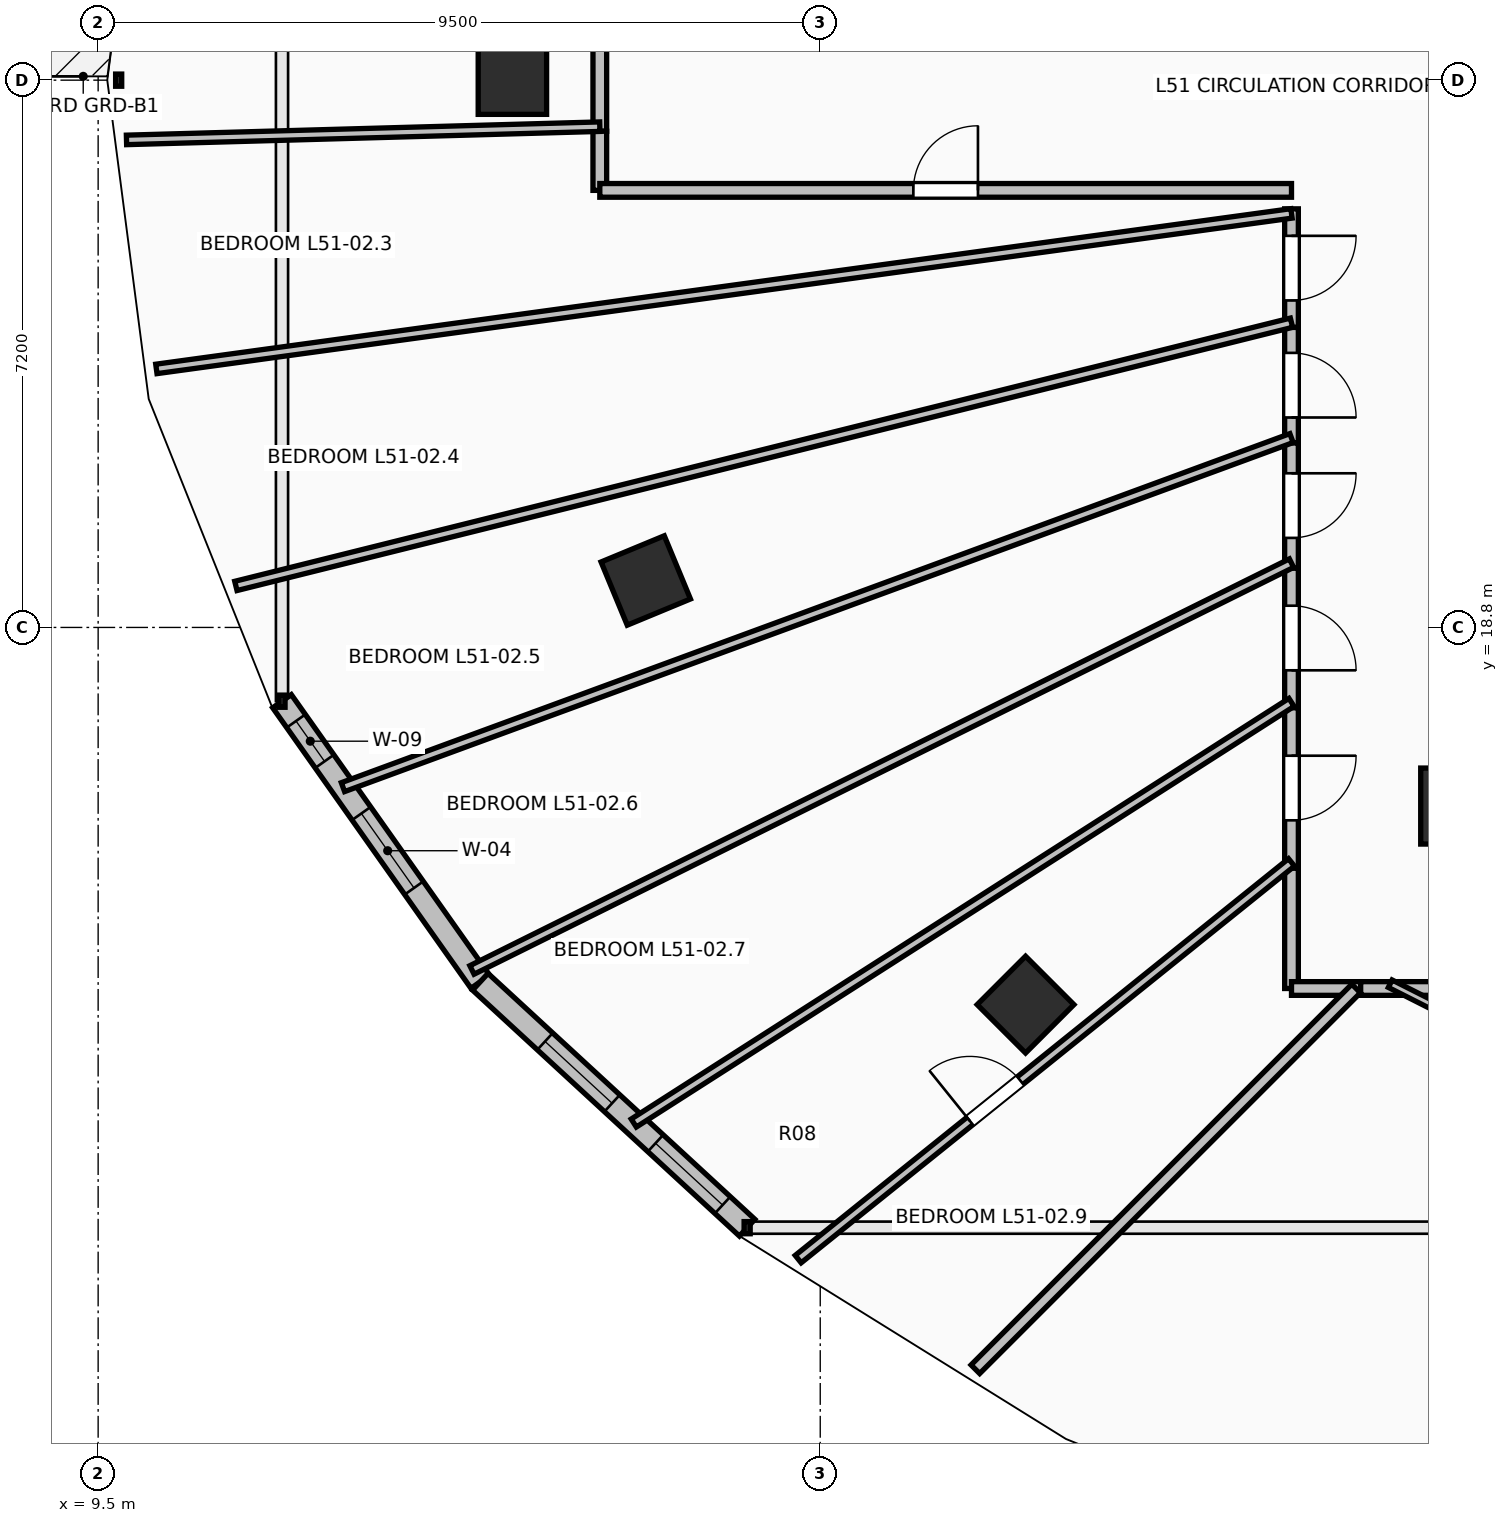
"""IFC4 building model, lengths in metres.
Left out: names, types, materials, properties, quantities, classifications, styles, units other than length and angle.
Written with IfcOpenShell. Run it as: python <this file> out.ifc"""

import sys

from ifc_helpers import new_model, si_unit, direction, frame, frame_2d, origin, origin_2d, place, context, subcontext, project, spatial, rectangle, extrude, element, fill, save


model = new_model("IFC4")
c1 = context("Model", 3, precision=1e-05, world=origin(), true_north=direction((0.0, 1.0)))
c2 = subcontext(c1, "Body", "Model", "MODEL_VIEW")
j1 = project(units=[si_unit("LENGTHUNIT", "METRE"), si_unit("PLANEANGLEUNIT", "RADIAN")], contexts=[c1])
p1 = place(None, origin())
s1 = spatial("IfcSite", under=j1, at=p1, CompositionType="ELEMENT")
p2 = place(p1, origin())
s2 = spatial("IfcBuilding", under=s1, at=p2, CompositionType="ELEMENT")
p3 = place(p2, frame((0.0, 0.0, 189.6)))
s3 = spatial("IfcBuildingStorey", under=s2, at=p3, CompositionType="ELEMENT", Elevation=189.6)
for number, where, z_axis, x_axis in (
    (1, (14.95, 26.0, 0.0), (0.0, 0.0, 1.0), (-1.0, 0.0, 0.0)),
    (2, (16.705, 19.418, 0.0), (0.0, 0.0, 1.0), (-0.924, -0.383, 0.0)),
    (3, (21.701, 13.838, 0.0), (0.0, 0.0, 1.0), (-0.707, -0.707, 0.0)),
):
    element("IfcColumn", number, at=place(p3, frame(where, z_axis=z_axis, x_axis=x_axis)), inside=s3, PredefinedType="COLUMN", context=c2, shape_type="SweptSolid", body=[
        extrude(rectangle(XDim=0.9, YDim=0.9, at=origin_2d()), origin(), (0.0, 0.0, 1.0), 3.5),
    ])
p4 = place(p3, frame((27.25, 16.45, 0.0), z_axis=(0.0, 0.0, 1.0), x_axis=(1.0, 0.0, 0.0)))
e4 = element("IfcColumn", 4, at=p4, inside=s3, PredefinedType="PILASTER", context=c2, shape_type="SweptSolid", body=[
    extrude(rectangle(XDim=0.7, YDim=1.0, at=origin_2d()), origin(), (0.0, 0.0, 1.0), 3.5),
])
p5 = place(p3, frame((11.919, 17.83, 0.0), z_axis=(0.0, 0.0, 1.0), x_axis=(0.577168747264, -0.81662490605, 0.0)))
e5 = element("IfcWall", 5, at=p5, inside=s3, PredefinedType="STANDARD", context=c2, shape_type="SweptSolid", body=[
    extrude(rectangle(XDim=4.52, YDim=0.3, at=frame_2d((2.26, 0.0))), origin(), (0.0, 0.0, 1.0), 3.24),
])
p6 = place(p5, frame((0.32, 0.0, 0.85)))
e6 = element("IfcOpeningElement", 6, at=p6, cuts=e5, PredefinedType="OPENING", context=c2, shape_type="SweptSolid", body=[
    extrude(rectangle(XDim=0.65, YDim=1.8, at=frame_2d((0.325, 0.9))), frame((0.0, 0.165, 0.0), z_axis=(0.0, -1.0, 0.0), x_axis=(1.0, 0.0, 0.0)), (0.0, 0.0, 1.0), 0.33),
])
p7 = place(p5, frame((1.809, 0.0, 0.85)))
e7 = element("IfcOpeningElement", 7, at=p7, cuts=e5, PredefinedType="OPENING", context=c2, shape_type="SweptSolid", body=[
    extrude(rectangle(XDim=1.2, YDim=1.95, at=frame_2d((0.6, 0.975))), frame((0.0, 0.165, 0.0), z_axis=(0.0, -1.0, 0.0), x_axis=(1.0, 0.0, 0.0)), (0.0, 0.0, 1.0), 0.33),
])
p8 = place(p3, frame((14.528, 14.139, 0.0), z_axis=(0.0, 0.0, 1.0), x_axis=(0.735359993374, -0.677676678177, 0.0)))
e8 = element("IfcWall", 8, at=p8, inside=s3, PredefinedType="STANDARD", context=c2, shape_type="SweptSolid", body=[
    extrude(rectangle(XDim=4.774, YDim=0.3, at=frame_2d((2.387, 0.0))), origin(), (0.0, 0.0, 1.0), 3.24),
])
p9 = place(p8, frame((1.158, 0.0, 0.85)))
e9 = element("IfcOpeningElement", 9, at=p9, cuts=e8, PredefinedType="OPENING", context=c2, shape_type="SweptSolid", body=[
    extrude(rectangle(XDim=1.2, YDim=1.95, at=frame_2d((0.6, 0.975))), frame((0.0, 0.165, 0.0), z_axis=(0.0, -1.0, 0.0), x_axis=(1.0, 0.0, 0.0)), (0.0, 0.0, 1.0), 0.33),
])
p10 = place(p8, frame((3.135, 0.0, 0.85)))
e10 = element("IfcOpeningElement", 10, at=p10, cuts=e8, PredefinedType="OPENING", context=c2, shape_type="SweptSolid", body=[
    extrude(rectangle(XDim=1.2, YDim=1.95, at=frame_2d((0.6, 0.975))), frame((0.0, 0.165, 0.0), z_axis=(0.0, -1.0, 0.0), x_axis=(1.0, 0.0, 0.0)), (0.0, 0.0, 1.0), 0.33),
])
p11 = place(p3, frame((16.1, 27.25, 0.0), z_axis=(0.0, 0.0, 1.0), x_axis=(0.0, -1.0, 0.0)))
e11 = element("IfcWall", 11, at=p11, inside=s3, PredefinedType="PARTITIONING", context=c2, shape_type="SweptSolid", body=[
    extrude(rectangle(XDim=1.922, YDim=0.18, at=frame_2d((0.961, 0.0))), origin(), (0.0, 0.0, 1.0), 2.432),
])
p12 = place(p3, frame((16.1, 25.328, 0.0), z_axis=(0.0, 0.0, 1.0), x_axis=(0.0, -1.0, 0.0)))
e12 = element("IfcWall", 12, at=p12, inside=s3, PredefinedType="PARTITIONING", context=c2, shape_type="SweptSolid", body=[
    extrude(rectangle(XDim=0.778, YDim=0.18, at=frame_2d((0.389, 0.0))), origin(), (0.0, 0.0, 1.0), 3.24),
])
p13 = place(p3, frame((16.1, 24.55, 0.0), z_axis=(0.0, 0.0, 1.0), x_axis=(1.0, 0.0, 0.0)))
e13 = element("IfcWall", 13, at=p13, inside=s3, PredefinedType="PARTITIONING", context=c2, shape_type="SweptSolid", body=[
    extrude(rectangle(XDim=9.1, YDim=0.18, at=frame_2d((4.55, 0.0))), origin(), (0.0, 0.0, 1.0), 2.922),
])
p14 = place(p13, frame((4.125, 0.0, 0.0)))
e14 = element("IfcOpeningElement", 14, at=p14, cuts=e13, PredefinedType="OPENING", context=c2, shape_type="SweptSolid", body=[
    extrude(rectangle(XDim=0.85, YDim=2.1, at=frame_2d((0.425, 1.05))), frame((0.0, 0.105, 0.0), z_axis=(0.0, -1.0, 0.0), x_axis=(1.0, 0.0, 0.0)), (0.0, 0.0, 1.0), 0.21),
])
p15 = place(p3, frame((25.2, 24.307, 0.0), z_axis=(0.0, 0.0, 1.0), x_axis=(0.0, -1.0, 0.0)))
e15 = element("IfcWall", 15, at=p15, inside=s3, PredefinedType="PARTITIONING", context=c2, shape_type="SweptSolid", body=[
    extrude(rectangle(XDim=1.56, YDim=0.18, at=frame_2d((0.78, 0.0))), origin(), (0.0, 0.0, 1.0), 3.24),
])
p16 = place(p15, frame((0.355, 0.0, 0.0)))
e16 = element("IfcOpeningElement", 16, at=p16, cuts=e15, PredefinedType="OPENING", context=c2, shape_type="SweptSolid", body=[
    extrude(rectangle(XDim=0.85, YDim=2.1, at=frame_2d((0.425, 1.05))), frame((0.0, 0.105, 0.0), z_axis=(0.0, -1.0, 0.0), x_axis=(1.0, 0.0, 0.0)), (0.0, 0.0, 1.0), 0.21),
])
p17 = place(p3, frame((25.2, 22.747, 0.0), z_axis=(0.0, 0.0, 1.0), x_axis=(0.0, -1.0, 0.0)))
e17 = element("IfcWall", 17, at=p17, inside=s3, PredefinedType="PARTITIONING", context=c2, shape_type="SweptSolid", body=[
    extrude(rectangle(XDim=1.52, YDim=0.18, at=frame_2d((0.76, 0.0))), origin(), (0.0, 0.0, 1.0), 3.24),
])
p18 = place(p17, frame((0.335, 0.0, 0.0)))
e18 = element("IfcOpeningElement", 18, at=p18, cuts=e17, PredefinedType="OPENING", context=c2, shape_type="SweptSolid", body=[
    extrude(rectangle(XDim=0.85, YDim=2.1, at=frame_2d((0.425, 1.05))), frame((0.0, 0.105, 0.0), z_axis=(0.0, -1.0, 0.0), x_axis=(1.0, 0.0, 0.0)), (0.0, 0.0, 1.0), 0.21),
])
p19 = place(p3, frame((25.2, 21.227, 0.0), z_axis=(0.0, 0.0, 1.0), x_axis=(0.0, -1.0, 0.0)))
e19 = element("IfcWall", 19, at=p19, inside=s3, PredefinedType="PARTITIONING", context=c2, shape_type="SweptSolid", body=[
    extrude(rectangle(XDim=1.648, YDim=0.18, at=frame_2d((0.824, 0.0))), origin(), (0.0, 0.0, 1.0), 3.24),
])
p20 = place(p19, frame((0.399, 0.0, 0.0)))
e20 = element("IfcOpeningElement", 20, at=p20, cuts=e19, PredefinedType="OPENING", context=c2, shape_type="SweptSolid", body=[
    extrude(rectangle(XDim=0.85, YDim=2.1, at=frame_2d((0.425, 1.05))), frame((0.0, 0.105, 0.0), z_axis=(0.0, -1.0, 0.0), x_axis=(1.0, 0.0, 0.0)), (0.0, 0.0, 1.0), 0.21),
])
p21 = place(p3, frame((25.2, 19.579, 0.0), z_axis=(0.0, 0.0, 1.0), x_axis=(0.0, -1.0, 0.0)))
e21 = element("IfcWall", 21, at=p21, inside=s3, PredefinedType="PARTITIONING", context=c2, shape_type="SweptSolid", body=[
    extrude(rectangle(XDim=1.836, YDim=0.18, at=frame_2d((0.918, 0.0))), origin(), (0.0, 0.0, 1.0), 3.24),
])
p22 = place(p21, frame((0.493, 0.0, 0.0)))
e22 = element("IfcOpeningElement", 22, at=p22, cuts=e21, PredefinedType="OPENING", context=c2, shape_type="SweptSolid", body=[
    extrude(rectangle(XDim=0.85, YDim=2.1, at=frame_2d((0.425, 1.05))), frame((0.0, 0.105, 0.0), z_axis=(0.0, -1.0, 0.0), x_axis=(1.0, 0.0, 0.0)), (0.0, 0.0, 1.0), 0.21),
])
p23 = place(p3, frame((25.2, 17.743, 0.0), z_axis=(0.0, 0.0, 1.0), x_axis=(0.0, -1.0, 0.0)))
e23 = element("IfcWall", 23, at=p23, inside=s3, PredefinedType="PARTITIONING", context=c2, shape_type="SweptSolid", body=[
    extrude(rectangle(XDim=2.111, YDim=0.18, at=frame_2d((1.055, 0.0))), origin(), (0.0, 0.0, 1.0), 2.432),
])
p24 = place(p23, frame((0.631, 0.0, 0.0)))
e24 = element("IfcOpeningElement", 24, at=p24, cuts=e23, PredefinedType="OPENING", context=c2, shape_type="SweptSolid", body=[
    extrude(rectangle(XDim=0.85, YDim=2.1, at=frame_2d((0.425, 1.05))), frame((0.0, 0.105, 0.0), z_axis=(0.0, -1.0, 0.0), x_axis=(1.0, 0.0, 0.0)), (0.0, 0.0, 1.0), 0.21),
])
p25 = place(p3, frame((25.2, 15.632, 0.0), z_axis=(0.0, 0.0, 1.0), x_axis=(0.0, -1.0, 0.0)))
e25 = element("IfcWall", 25, at=p25, inside=s3, PredefinedType="PARTITIONING", context=c2, shape_type="SweptSolid", body=[
    extrude(rectangle(XDim=1.582, YDim=0.18, at=frame_2d((0.791, 0.0))), origin(), (0.0, 0.0, 1.0), 2.432),
])
p26 = place(p3, frame((25.2, 14.05, 0.0), z_axis=(0.0, 0.0, 1.0), x_axis=(1.0, 0.0, 0.0)))
e26 = element("IfcWall", 26, at=p26, inside=s3, PredefinedType="PARTITIONING", context=c2, shape_type="SweptSolid", body=[
    extrude(rectangle(XDim=0.91, YDim=0.18, at=frame_2d((0.455, 0.0))), origin(), (0.0, 0.0, 1.0), 2.922),
])
p27 = place(p3, frame((26.11, 14.05, 0.0), z_axis=(0.0, 0.0, 1.0), x_axis=(1.0, 0.0, 0.0)))
e27 = element("IfcWall", 27, at=p27, inside=s3, PredefinedType="PARTITIONING", context=c2, shape_type="SweptSolid", body=[
    extrude(rectangle(XDim=0.647, YDim=0.18, at=frame_2d((0.323, 0.0))), origin(), (0.0, 0.0, 1.0), 3.24),
])
p28 = place(p3, frame((26.617, 14.05, 0.0), z_axis=(0.0, 0.0, 1.0), x_axis=(1.0, 0.0, 0.0)))
e28 = element("IfcWall", 28, at=p28, inside=s3, PredefinedType="PARTITIONING", context=c2, shape_type="SweptSolid", body=[
    extrude(rectangle(XDim=5.834, YDim=0.18, at=frame_2d((2.917, 0.0))), origin(), (0.0, 0.0, 1.0), 2.432),
])
p29 = place(p3, frame((9.873, 25.214, 0.0), z_axis=(0.0, 0.0, 1.0), x_axis=(0.999610603939, 0.027904130401, 0.0)))
e29 = element("IfcWall", 29, at=p29, inside=s3, PredefinedType="PARTITIONING", context=c2, shape_type="SweptSolid", body=[
    extrude(rectangle(XDim=6.229, YDim=0.125, at=frame_2d((3.115, 0.0))), origin(), (0.0, 0.0, 1.0), 2.774),
])
p30 = place(p3, frame((10.266, 22.201, 0.0), z_axis=(0.0, 0.0, 1.0), x_axis=(0.990743725495, 0.135745609106, 0.0)))
e30 = element("IfcWall", 30, at=p30, inside=s3, PredefinedType="PARTITIONING", context=c2, shape_type="SweptSolid", body=[
    extrude(rectangle(XDim=15.073, YDim=0.125, at=frame_2d((7.537, 0.0))), origin(), (0.0, 0.0, 1.0), 2.774),
])
p31 = place(p3, frame((11.312, 19.346, 0.0), z_axis=(0.0, 0.0, 1.0), x_axis=(0.970287811835, 0.241953636475, 0.0)))
e31 = element("IfcWall", 31, at=p31, inside=s3, PredefinedType="PARTITIONING", context=c2, shape_type="SweptSolid", body=[
    extrude(rectangle(XDim=14.313, YDim=0.125, at=frame_2d((7.157, 0.0))), origin(), (0.0, 0.0, 1.0), 2.774),
])
p32 = place(p3, frame((12.721, 16.699, 0.0), z_axis=(0.0, 0.0, 1.0), x_axis=(0.938476898763, 0.34534201958, 0.0)))
e32 = element("IfcWall", 32, at=p32, inside=s3, PredefinedType="PARTITIONING", context=c2, shape_type="SweptSolid", body=[
    extrude(rectangle(XDim=13.297, YDim=0.125, at=frame_2d((6.648, 0.0))), origin(), (0.0, 0.0, 1.0), 2.432),
])
p33 = place(p3, frame((14.418, 14.294, 0.0), z_axis=(0.0, 0.0, 1.0), x_axis=(0.895717443483, 0.444623730182, 0.0)))
e33 = element("IfcWall", 33, at=p33, inside=s3, PredefinedType="PARTITIONING", context=c2, shape_type="SweptSolid", body=[
    extrude(rectangle(XDim=12.037, YDim=0.125, at=frame_2d((6.019, 0.0))), origin(), (0.0, 0.0, 1.0), 2.432),
])
p34 = place(p3, frame((16.547, 12.28, 0.0), z_axis=(0.0, 0.0, 1.0), x_axis=(0.842442736758, 0.53878589002, 0.0)))
e34 = element("IfcWall", 34, at=p34, inside=s3, PredefinedType="PARTITIONING", context=c2, shape_type="SweptSolid", body=[
    extrude(rectangle(XDim=10.271, YDim=0.125, at=frame_2d((5.136, 0.0))), origin(), (0.0, 0.0, 1.0), 2.432),
])
p35 = place(p3, frame((18.71, 10.49, 0.0), z_axis=(0.0, 0.0, 1.0), x_axis=(0.779284718529, 0.626670030771, 0.0)))
e35 = element("IfcWall", 35, at=p35, inside=s3, PredefinedType="PARTITIONING", context=c2, shape_type="SweptSolid", body=[
    extrude(rectangle(XDim=8.328, YDim=0.125, at=frame_2d((4.164, 0.0))), origin(), (0.0, 0.0, 1.0), 2.432),
])
p36 = place(p35, frame((2.899, 0.0, 0.0)))
e36 = element("IfcOpeningElement", 36, at=p36, cuts=e35, PredefinedType="OPENING", context=c2, shape_type="SweptSolid", body=[
    extrude(rectangle(XDim=0.85, YDim=2.1, at=frame_2d((0.425, 1.05))), frame((0.0, 0.077, 0.0), z_axis=(0.0, -1.0, 0.0), x_axis=(1.0, 0.0, 0.0)), (0.0, 0.0, 1.0), 0.155),
])
p37 = place(p3, frame((21.041, 9.041, 0.0), z_axis=(0.0, 0.0, 1.0), x_axis=(0.707106781187, 0.707106781187, 0.0)))
e37 = element("IfcWall", 37, at=p37, inside=s3, PredefinedType="PARTITIONING", context=c2, shape_type="SweptSolid", body=[
    extrude(rectangle(XDim=7.084, YDim=0.16, at=frame_2d((3.542, 0.0))), origin(), (0.0, 0.0, 1.0), 2.774),
])
p38 = place(p3, frame((30.533, 12.075, 0.0), z_axis=(0.0, 0.0, 1.0), x_axis=(-0.892550333972, 0.450947781153, 0.0)))
e38 = element("IfcWall", 38, at=p38, inside=s3, PredefinedType="PARTITIONING", context=c2, shape_type="SweptSolid", body=[
    extrude(rectangle(XDim=4.52, YDim=0.11, at=frame_2d((2.26, 0.0))), origin(), (0.0, 0.0, 1.0), 2.432),
])
p39 = place(p38, frame((1.835, 0.0, 0.0)))
e39 = element("IfcOpeningElement", 39, at=p39, cuts=e38, PredefinedType="OPENING", context=c2, shape_type="SweptSolid", body=[
    extrude(rectangle(XDim=0.85, YDim=2.1, at=frame_2d((0.425, 1.05))), frame((0.0, 0.07, 0.0), z_axis=(0.0, -1.0, 0.0), x_axis=(1.0, 0.0, 0.0)), (0.0, 0.0, 1.0), 0.14),
])
p40 = place(p6, origin())
e40 = element("IfcWindow", 40, at=p40, inside=s3, PartitioningType="SINGLE_PANEL", PredefinedType="WINDOW", context=c2, shape_type="SweptSolid", body=[
    extrude(rectangle(XDim=0.65, YDim=1.8, at=frame_2d((0.325, 0.9))), frame((0.0, 0.03, 0.0), z_axis=(0.0, -1.0, 0.0), x_axis=(1.0, 0.0, 0.0)), (0.0, 0.0, 1.0), 0.06),
])
fill(e6, e40)
p41 = place(p7, origin())
e41 = element("IfcWindow", 41, at=p41, inside=s3, PartitioningType="SINGLE_PANEL", PredefinedType="WINDOW", context=c2, shape_type="SweptSolid", body=[
    extrude(rectangle(XDim=1.2, YDim=1.95, at=frame_2d((0.6, 0.975))), frame((0.0, 0.03, 0.0), z_axis=(0.0, -1.0, 0.0), x_axis=(1.0, 0.0, 0.0)), (0.0, 0.0, 1.0), 0.06),
])
fill(e7, e41)
p42 = place(p9, origin())
e42 = element("IfcWindow", 42, at=p42, inside=s3, PartitioningType="SINGLE_PANEL", PredefinedType="WINDOW", context=c2, shape_type="SweptSolid", body=[
    extrude(rectangle(XDim=1.2, YDim=1.95, at=frame_2d((0.6, 0.975))), frame((0.0, 0.03, 0.0), z_axis=(0.0, -1.0, 0.0), x_axis=(1.0, 0.0, 0.0)), (0.0, 0.0, 1.0), 0.06),
])
fill(e9, e42)
p43 = place(p10, origin())
e43 = element("IfcWindow", 43, at=p43, inside=s3, PartitioningType="SINGLE_PANEL", PredefinedType="WINDOW", context=c2, shape_type="SweptSolid", body=[
    extrude(rectangle(XDim=1.2, YDim=1.95, at=frame_2d((0.6, 0.975))), frame((0.0, 0.03, 0.0), z_axis=(0.0, -1.0, 0.0), x_axis=(1.0, 0.0, 0.0)), (0.0, 0.0, 1.0), 0.06),
])
fill(e10, e43)
p44 = place(p14, origin())
e44 = element("IfcDoor", 44, at=p44, inside=s3, OperationType="SINGLE_SWING_RIGHT", PredefinedType="DOOR", context=c2, shape_type="SweptSolid", body=[
    extrude(rectangle(XDim=0.85, YDim=2.1, at=frame_2d((0.425, 1.05))), frame((0.0, 0.025, 0.0), z_axis=(0.0, -1.0, 0.0), x_axis=(1.0, 0.0, 0.0)), (0.0, 0.0, 1.0), 0.05),
])
fill(e14, e44)
p45 = place(p16, origin())
e45 = element("IfcDoor", 45, at=p45, inside=s3, OperationType="SINGLE_SWING_LEFT", PredefinedType="DOOR", context=c2, shape_type="SweptSolid", body=[
    extrude(rectangle(XDim=0.85, YDim=2.1, at=frame_2d((0.425, 1.05))), frame((0.0, 0.025, 0.0), z_axis=(0.0, -1.0, 0.0), x_axis=(1.0, 0.0, 0.0)), (0.0, 0.0, 1.0), 0.05),
])
fill(e16, e45)
p46 = place(p18, origin())
e46 = element("IfcDoor", 46, at=p46, inside=s3, OperationType="SINGLE_SWING_RIGHT", PredefinedType="DOOR", context=c2, shape_type="SweptSolid", body=[
    extrude(rectangle(XDim=0.85, YDim=2.1, at=frame_2d((0.425, 1.05))), frame((0.0, 0.025, 0.0), z_axis=(0.0, -1.0, 0.0), x_axis=(1.0, 0.0, 0.0)), (0.0, 0.0, 1.0), 0.05),
])
fill(e18, e46)
p47 = place(p20, origin())
e47 = element("IfcDoor", 47, at=p47, inside=s3, OperationType="SINGLE_SWING_LEFT", PredefinedType="DOOR", context=c2, shape_type="SweptSolid", body=[
    extrude(rectangle(XDim=0.85, YDim=2.1, at=frame_2d((0.425, 1.05))), frame((0.0, 0.025, 0.0), z_axis=(0.0, -1.0, 0.0), x_axis=(1.0, 0.0, 0.0)), (0.0, 0.0, 1.0), 0.05),
])
fill(e20, e47)
p48 = place(p22, origin())
e48 = element("IfcDoor", 48, at=p48, inside=s3, OperationType="SINGLE_SWING_RIGHT", PredefinedType="DOOR", context=c2, shape_type="SweptSolid", body=[
    extrude(rectangle(XDim=0.85, YDim=2.1, at=frame_2d((0.425, 1.05))), frame((0.0, 0.025, 0.0), z_axis=(0.0, -1.0, 0.0), x_axis=(1.0, 0.0, 0.0)), (0.0, 0.0, 1.0), 0.05),
])
fill(e22, e48)
p49 = place(p24, origin())
e49 = element("IfcDoor", 49, at=p49, inside=s3, OperationType="SINGLE_SWING_LEFT", PredefinedType="DOOR", context=c2, shape_type="SweptSolid", body=[
    extrude(rectangle(XDim=0.85, YDim=2.1, at=frame_2d((0.425, 1.05))), frame((0.0, 0.025, 0.0), z_axis=(0.0, -1.0, 0.0), x_axis=(1.0, 0.0, 0.0)), (0.0, 0.0, 1.0), 0.05),
])
fill(e24, e49)
p50 = place(p36, origin())
e50 = element("IfcDoor", 50, at=p50, inside=s3, OperationType="SINGLE_SWING_LEFT", PredefinedType="DOOR", context=c2, shape_type="SweptSolid", body=[
    extrude(rectangle(XDim=0.85, YDim=2.1, at=frame_2d((0.425, 1.05))), frame((0.0, 0.025, 0.0), z_axis=(0.0, -1.0, 0.0), x_axis=(1.0, 0.0, 0.0)), (0.0, 0.0, 1.0), 0.05),
])
fill(e36, e50)
save(model, sys.argv[1])
